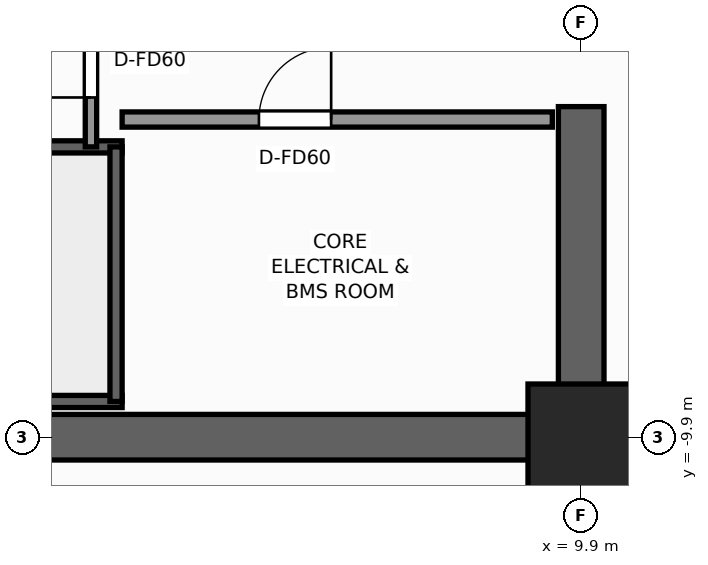
"""IFC4 building model, lengths in metres.
Left out: names, types, materials, properties, quantities, classifications, styles, units other than length and angle.
Written with IfcOpenShell. Run it as: python <this file> out.ifc"""

import sys

from ifc_helpers import new_model, si_unit, direction, frame, frame_2d, origin, origin_2d, place, context, subcontext, project, spatial, rectangle, extrude, element, fill, save


model = new_model("IFC4")
c1 = context("Model", 3, precision=1e-05, world=origin(), true_north=direction((0.0, 1.0)))
c2 = subcontext(c1, "Body", "Model", "MODEL_VIEW")
j1 = project(units=[si_unit("LENGTHUNIT", "METRE"), si_unit("PLANEANGLEUNIT", "RADIAN")], contexts=[c1])
p1 = place(None, origin())
s1 = spatial("IfcSite", under=j1, at=p1, CompositionType="ELEMENT")
p2 = place(p1, origin())
s2 = spatial("IfcBuilding", under=s1, at=p2, CompositionType="ELEMENT")
p3 = place(p2, frame((0.0, 0.0, 105.2)))
s3 = spatial("IfcBuildingStorey", under=s2, at=p3, CompositionType="ELEMENT", Elevation=105.2)
p4 = place(p3, frame((10.2, -9.9, 0.0), z_axis=(0.0, 0.0, 1.0), x_axis=(-1.0, 0.0, 0.0)))
e1 = element("IfcWall", 1, at=p4, inside=s3, PredefinedType="SHEAR", context=c2, shape_type="SweptSolid", body=[
    extrude(rectangle(XDim=12.06, YDim=0.6, at=frame_2d((6.03, 0.0))), origin(), (0.0, 0.0, 1.0), 3.3),
])
p5 = place(p3, frame((9.9, -9.6, 0.0), z_axis=(0.0, 0.0, 1.0), x_axis=(0.0, 1.0, 0.0)))
e2 = element("IfcWall", 2, at=p5, inside=s3, PredefinedType="SHEAR", context=c2, shape_type="SweptSolid", body=[
    extrude(rectangle(XDim=4.05, YDim=0.6, at=frame_2d((2.025, 0.0))), origin(), (0.0, 0.0, 1.0), 3.3),
])
p6 = place(p3, frame((9.9, -9.9, 0.0), z_axis=(0.0, 0.0, 1.0), x_axis=(1.0, 0.0, 0.0)))
e3 = element("IfcColumn", 3, at=p6, inside=s3, PredefinedType="COLUMN", context=c2, shape_type="SweptSolid", body=[
    extrude(rectangle(XDim=1.4, YDim=1.4, at=origin_2d()), origin(), (0.0, 0.0, 1.0), 3.3),
])
p7 = place(p3, frame((3.86, -9.43, 0.0), z_axis=(0.0, 0.0, 1.0), x_axis=(-1.0, 0.0, 0.0)))
e4 = element("IfcWall", 4, at=p7, inside=s3, PredefinedType="SHEAR", context=c2, shape_type="SweptSolid", body=[
    extrude(rectangle(XDim=7.72, YDim=0.16, at=frame_2d((3.86, 0.0))), origin(), (0.0, 0.0, 1.0), 3.3),
])
p8 = place(p7, frame((6.01, 0.0, 0.0)))
e5 = element("IfcOpeningElement", 5, at=p8, cuts=e4, PredefinedType="OPENING", context=c2, shape_type="SweptSolid", body=[
    extrude(rectangle(XDim=1.1, YDim=2.2, at=frame_2d((0.55, 1.1))), frame((0.0, 0.09, 0.0), z_axis=(0.0, -1.0, 0.0), x_axis=(1.0, 0.0, 0.0)), (0.0, 0.0, 1.0), 0.18),
])
p9 = place(p3, frame((-3.86, -6.08, 0.0), z_axis=(0.0, 0.0, 1.0), x_axis=(1.0, 0.0, 0.0)))
e6 = element("IfcWall", 6, at=p9, inside=s3, PredefinedType="SHEAR", context=c2, shape_type="SweptSolid", body=[
    extrude(rectangle(XDim=7.72, YDim=0.16, at=frame_2d((3.86, 0.0))), origin(), (0.0, 0.0, 1.0), 3.3),
])
p10 = place(p3, frame((3.78, -9.43, 0.0), z_axis=(0.0, 0.0, 1.0), x_axis=(0.0, 1.0, 0.0)))
e7 = element("IfcWall", 7, at=p10, inside=s3, PredefinedType="SHEAR", context=c2, shape_type="SweptSolid", body=[
    extrude(rectangle(XDim=3.35, YDim=0.16, at=frame_2d((1.675, 0.0))), origin(), (0.0, 0.0, 1.0), 3.3),
])
p11 = place(p3, frame((3.86, -5.72, 0.0), z_axis=(0.0, 0.0, 1.0), x_axis=(1.0, 0.0, 0.0)))
e8 = element("IfcWall", 8, at=p11, inside=s3, PredefinedType="SOLIDWALL", context=c2, shape_type="SweptSolid", body=[
    extrude(rectangle(XDim=5.66, YDim=0.2, at=frame_2d((2.83, 0.0))), origin(), (0.0, 0.0, 1.0), 3.08),
])
p12 = place(p11, frame((1.8, 0.0, 0.0)))
e9 = element("IfcOpeningElement", 9, at=p12, cuts=e8, PredefinedType="OPENING", context=c2, shape_type="SweptSolid", body=[
    extrude(rectangle(XDim=0.95, YDim=2.06, at=frame_2d((0.475, 1.03))), frame((0.0, 0.11, 0.0), z_axis=(0.0, -1.0, 0.0), x_axis=(1.0, 0.0, 0.0)), (0.0, 0.0, 1.0), 0.22),
])
p13 = place(p3, frame((3.45, -6.08, 0.0), z_axis=(0.0, 0.0, 1.0), x_axis=(0.0, 1.0, 0.0)))
e10 = element("IfcWall", 10, at=p13, inside=s3, PredefinedType="PARTITIONING", context=c2, shape_type="SweptSolid", body=[
    extrude(rectangle(XDim=2.36, YDim=0.15, at=frame_2d((1.18, 0.0))), origin(), (0.0, 0.0, 1.0), 3.08),
])
p14 = place(p13, frame((0.65, 0.0, 0.0)))
e11 = element("IfcOpeningElement", 11, at=p14, cuts=e10, PredefinedType="OPENING", context=c2, shape_type="SweptSolid", body=[
    extrude(rectangle(XDim=0.95, YDim=2.06, at=frame_2d((0.475, 1.03))), frame((0.0, 0.085, 0.0), z_axis=(0.0, -1.0, 0.0), x_axis=(1.0, 0.0, 0.0)), (0.0, 0.0, 1.0), 0.17),
])
p15 = place(p12, origin())
e12 = element("IfcDoor", 12, at=p15, inside=s3, OperationType="SINGLE_SWING_RIGHT", PredefinedType="DOOR", context=c2, shape_type="SweptSolid", body=[
    extrude(rectangle(XDim=0.95, YDim=2.06, at=frame_2d((0.475, 1.03))), frame((0.0, 0.025, 0.0), z_axis=(0.0, -1.0, 0.0), x_axis=(1.0, 0.0, 0.0)), (0.0, 0.0, 1.0), 0.05),
])
fill(e9, e12)
p16 = place(p14, origin())
e13 = element("IfcDoor", 13, at=p16, inside=s3, OperationType="SINGLE_SWING_LEFT", PredefinedType="DOOR", context=c2, shape_type="SweptSolid", body=[
    extrude(rectangle(XDim=0.95, YDim=2.06, at=frame_2d((0.475, 1.03))), frame((0.0, 0.025, 0.0), z_axis=(0.0, -1.0, 0.0), x_axis=(1.0, 0.0, 0.0)), (0.0, 0.0, 1.0), 0.05),
])
fill(e11, e13)
save(model, sys.argv[1])
